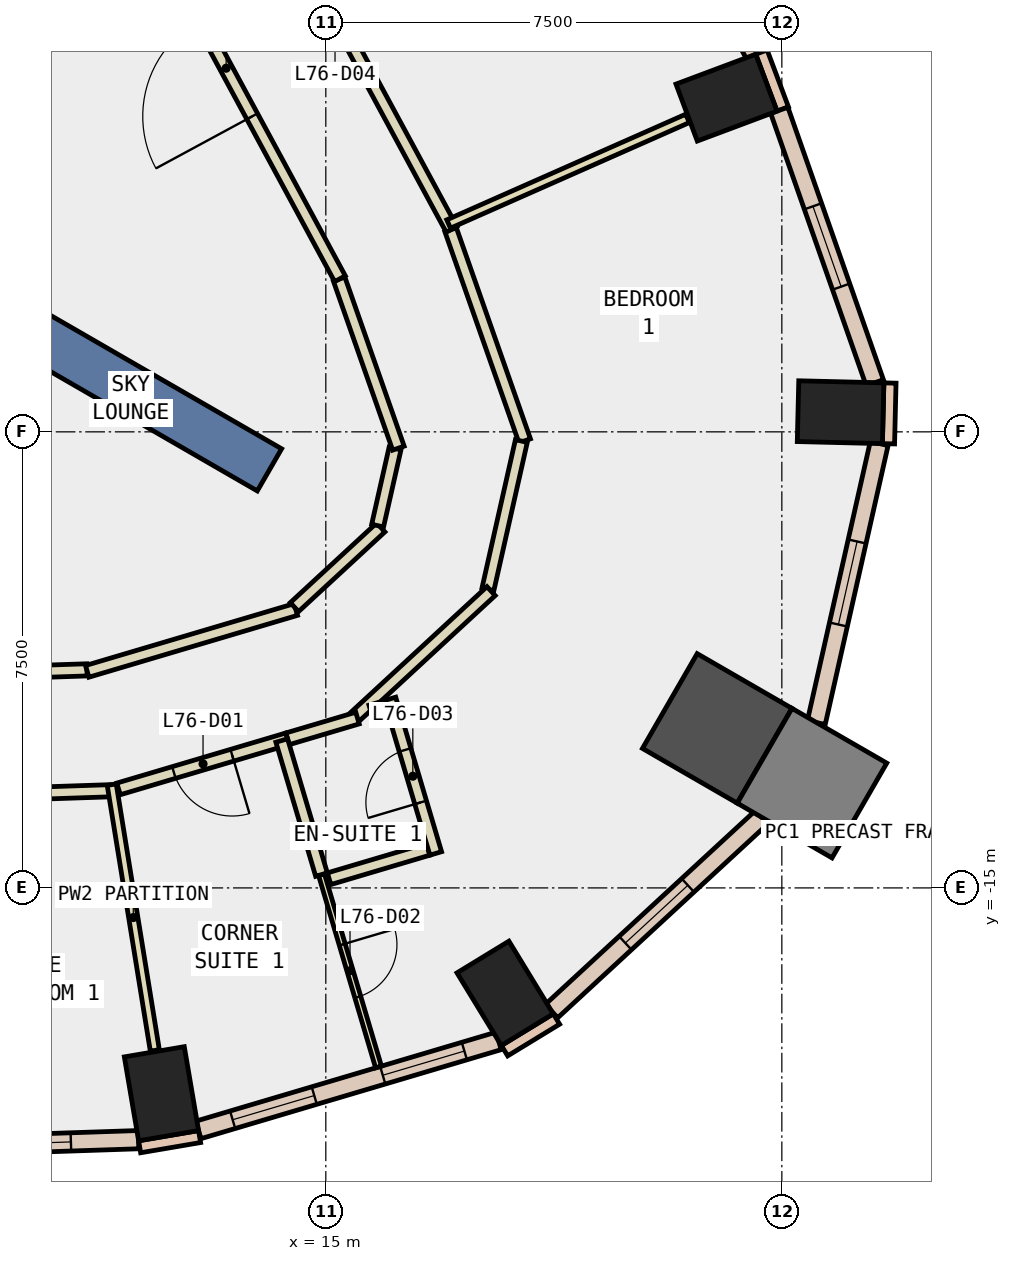
"""IFC4 building model, lengths in metres.
Left out: names, types, materials, properties, quantities, classifications, styles, units other than length and angle.
Written with IfcOpenShell. Run it as: python <this file> out.ifc"""

import sys

from ifc_helpers import new_model, si_unit, direction, frame, frame_2d, origin, origin_2d, place, context, subcontext, project, spatial, rectangle, extrude, element, fill, save


model = new_model("IFC4")
c1 = context("Model", 3, precision=1e-05, world=origin(), true_north=direction((0.0, 1.0)))
c2 = subcontext(c1, "Body", "Model", "MODEL_VIEW")
j1 = project(units=[si_unit("LENGTHUNIT", "METRE"), si_unit("PLANEANGLEUNIT", "RADIAN")], contexts=[c1])
p1 = place(None, origin())
s1 = spatial("IfcSite", under=j1, at=p1, CompositionType="ELEMENT")
p2 = place(p1, origin())
s2 = spatial("IfcBuilding", under=s1, at=p2, CompositionType="ELEMENT")
p3 = place(p2, frame((0.0, 0.0, 322.4)))
s3 = spatial("IfcBuildingStorey", under=s2, at=p3, CompositionType="ELEMENT", Elevation=322.4)
for number, where, z_axis, x_axis in (
    (1, (12.297, -18.385, -0.34), (0.0, 0.0, 1.0), (0.986, 0.168, 0.0)),
    (2, (17.949, -16.734, -0.34), (0.0, 0.0, 1.0), (0.854, 0.521, 0.0)),
):
    element("IfcColumn", number, at=place(p3, frame(where, z_axis=z_axis, x_axis=x_axis)), inside=s3, PredefinedType="COLUMN", context=c2, shape_type="SweptSolid", body=[
        extrude(rectangle(XDim=1.0, YDim=1.4, at=origin_2d()), origin(), (0.0, 0.0, 1.0), 3.34),
    ])
p4 = place(p3, frame((21.437, -12.377, -0.34), z_axis=(0.0, 0.0, 1.0), x_axis=(-0.866025403784, 0.5, 0.0)))
e3 = element("IfcColumn", 3, at=p4, inside=s3, PredefinedType="COLUMN", context=c2, shape_type="SweptSolid", body=[
    extrude(rectangle(XDim=1.8, YDim=1.8, at=origin_2d()), origin(), (0.0, 0.0, 1.0), 3.34),
])
for number, where, z_axis, x_axis in (
    (4, (23.466, -7.177, -0.34), (0.0, 0.0, 1.0), (0.024, 1.0, 0.0)),
    (5, (21.59, -2.004, -0.34), (0.0, 0.0, 1.0), (-0.351, 0.936, 0.0)),
):
    element("IfcColumn", number, at=place(p3, frame(where, z_axis=z_axis, x_axis=x_axis)), inside=s3, PredefinedType="COLUMN", context=c2, shape_type="SweptSolid", body=[
        extrude(rectangle(XDim=1.0, YDim=1.4, at=origin_2d()), origin(), (0.0, 0.0, 1.0), 3.34),
    ])
p5 = place(p3, frame((22.996, -13.277, -0.34), z_axis=(0.0, 0.0, 1.0), x_axis=(-0.866025403784, 0.5, 0.0)))
e6 = element("IfcColumn", 6, at=p5, inside=s3, PredefinedType="COLUMN", context=c2, shape_type="SweptSolid", body=[
    extrude(rectangle(XDim=1.8, YDim=1.8, at=origin_2d()), origin(), (0.0, 0.0, 1.0), 3.34),
])
p6 = place(p3, frame((6.279, -3.625, -0.34), z_axis=(0.0, 0.0, 1.0), x_axis=(0.866017533419, -0.500013631625, 0.0)))
e7 = element("IfcWall", 7, at=p6, inside=s3, PredefinedType="SHEAR", context=c2, shape_type="SweptSolid", body=[
    extrude(rectangle(XDim=9.0, YDim=0.8, at=frame_2d((4.5, 0.0))), origin(), (0.0, 0.0, 1.0), 3.34),
])
p7 = place(p3, frame((22.515, -2.191, 0.0), z_axis=(0.0, 0.0, 1.0), x_axis=(-0.350962844851, 0.936389385637, 0.0)))
e8 = element("IfcWall", 8, at=p7, inside=s3, PredefinedType="STANDARD", context=c2, shape_type="SweptSolid", body=[
    extrude(rectangle(XDim=1.0, YDim=0.2, at=frame_2d((0.5, 0.0))), origin(), (0.0, 0.0, 1.0), 3.0),
])
p8 = place(p3, frame((11.938, -19.257, 0.0), z_axis=(0.0, 0.0, 1.0), x_axis=(0.985800545746, 0.167920469293, 0.0)))
e9 = element("IfcWall", 9, at=p8, inside=s3, PredefinedType="STANDARD", context=c2, shape_type="SweptSolid", body=[
    extrude(rectangle(XDim=1.0, YDim=0.2, at=frame_2d((0.5, 0.0))), origin(), (0.0, 0.0, 1.0), 3.0),
])
p9 = place(p3, frame((17.939, -17.677, 0.0), z_axis=(0.0, 0.0, 1.0), x_axis=(0.853679739553, 0.520798331677, 0.0)))
e10 = element("IfcWall", 10, at=p9, inside=s3, PredefinedType="STANDARD", context=c2, shape_type="SweptSolid", body=[
    extrude(rectangle(XDim=1.0, YDim=0.2, at=frame_2d((0.5, 0.0))), origin(), (0.0, 0.0, 1.0), 3.0),
])
p10 = place(p3, frame((24.254, -7.696, 0.0), z_axis=(0.0, 0.0, 1.0), x_axis=(0.024186470916, 0.999707464524, 0.0)))
e11 = element("IfcWall", 11, at=p10, inside=s3, PredefinedType="STANDARD", context=c2, shape_type="SweptSolid", body=[
    extrude(rectangle(XDim=0.999, YDim=0.2, at=frame_2d((0.5, 0.0))), origin(), (0.0, 0.0, 1.0), 3.0),
])
p11 = place(p3, frame((8.296, -19.261, 0.0), z_axis=(0.0, 0.0, 1.0), x_axis=(0.999441913039, 0.033404527552, 0.0)))
e12 = element("IfcWall", 12, at=p11, inside=s3, PredefinedType="STANDARD", context=c2, shape_type="SweptSolid", body=[
    extrude(rectangle(XDim=3.625, YDim=0.3, at=frame_2d((1.812, 0.0))), origin(), (0.0, 0.0, 1.0), 3.0),
])
p12 = place(p11, frame((1.113, 0.0, 0.9)))
e13 = element("IfcOpeningElement", 13, at=p12, cuts=e12, PredefinedType="OPENING", context=c2, shape_type="SweptSolid", body=[
    extrude(rectangle(XDim=1.4, YDim=2.0, at=frame_2d((0.7, 1.0))), frame((0.0, 0.16, 0.0), z_axis=(0.0, -1.0, 0.0), x_axis=(1.0, 0.0, 0.0)), (0.0, 0.0, 1.0), 0.32),
])
p13 = place(p3, frame((12.904, -18.98, 0.0), z_axis=(0.0, 0.0, 1.0), x_axis=(0.958757933751, 0.284223898486, 0.0)))
e14 = element("IfcWall", 14, at=p13, inside=s3, PredefinedType="STANDARD", context=c2, shape_type="SweptSolid", body=[
    extrude(rectangle(XDim=5.15, YDim=0.3, at=frame_2d((2.575, 0.0))), origin(), (0.0, 0.0, 1.0), 3.0),
])
p14 = place(p13, frame((0.588, 0.0, 0.9)))
e15 = element("IfcOpeningElement", 15, at=p14, cuts=e14, PredefinedType="OPENING", context=c2, shape_type="SweptSolid", body=[
    extrude(rectangle(XDim=1.4, YDim=2.0, at=frame_2d((0.7, 1.0))), frame((0.0, 0.16, 0.0), z_axis=(0.0, -1.0, 0.0), x_axis=(1.0, 0.0, 0.0)), (0.0, 0.0, 1.0), 0.32),
])
p15 = place(p13, frame((3.163, 0.0, 0.9)))
e16 = element("IfcOpeningElement", 16, at=p15, cuts=e14, PredefinedType="OPENING", context=c2, shape_type="SweptSolid", body=[
    extrude(rectangle(XDim=1.4, YDim=2.0, at=frame_2d((0.7, 1.0))), frame((0.0, 0.16, 0.0), z_axis=(0.0, -1.0, 0.0), x_axis=(1.0, 0.0, 0.0)), (0.0, 0.0, 1.0), 0.32),
])
p16 = place(p3, frame((18.712, -17.026, 0.0), z_axis=(0.0, 0.0, 1.0), x_axis=(0.734934798699, 0.678137774838, 0.0)))
e17 = element("IfcWall", 17, at=p16, inside=s3, PredefinedType="STANDARD", context=c2, shape_type="SweptSolid", body=[
    extrude(rectangle(XDim=4.703, YDim=0.3, at=frame_2d((2.351, 0.0))), origin(), (0.0, 0.0, 1.0), 3.0),
])
p17 = place(p16, frame((1.651, 0.0, 0.9)))
e18 = element("IfcOpeningElement", 18, at=p17, cuts=e17, PredefinedType="OPENING", context=c2, shape_type="SweptSolid", body=[
    extrude(rectangle(XDim=1.4, YDim=2.0, at=frame_2d((0.7, 1.0))), frame((0.0, 0.16, 0.0), z_axis=(0.0, -1.0, 0.0), x_axis=(1.0, 0.0, 0.0)), (0.0, 0.0, 1.0), 0.32),
])
p18 = place(p3, frame((23.067, -12.28, 0.0), z_axis=(0.0, 0.0, 1.0), x_axis=(0.219886442412, 0.975525475036, 0.0)))
e19 = element("IfcWall", 19, at=p18, inside=s3, PredefinedType="STANDARD", context=c2, shape_type="SweptSolid", body=[
    extrude(rectangle(XDim=4.703, YDim=0.3, at=frame_2d((2.352, 0.0))), origin(), (0.0, 0.0, 1.0), 3.0),
])
p19 = place(p18, frame((1.652, 0.0, 0.9)))
e20 = element("IfcOpeningElement", 20, at=p19, cuts=e19, PredefinedType="OPENING", context=c2, shape_type="SweptSolid", body=[
    extrude(rectangle(XDim=1.4, YDim=2.0, at=frame_2d((0.7, 1.0))), frame((0.0, 0.16, 0.0), z_axis=(0.0, -1.0, 0.0), x_axis=(1.0, 0.0, 0.0)), (0.0, 0.0, 1.0), 0.32),
])
p20 = place(p3, frame((24.029, -6.692, 0.0), z_axis=(0.0, 0.0, 1.0), x_axis=(-0.330923030855, 0.943657749213, 0.0)))
e21 = element("IfcWall", 21, at=p20, inside=s3, PredefinedType="STANDARD", context=c2, shape_type="SweptSolid", body=[
    extrude(rectangle(XDim=4.748, YDim=0.3, at=frame_2d((2.374, 0.0))), origin(), (0.0, 0.0, 1.0), 3.0),
])
p21 = place(p20, frame((1.674, 0.0, 0.9)))
e22 = element("IfcOpeningElement", 22, at=p21, cuts=e21, PredefinedType="OPENING", context=c2, shape_type="SweptSolid", body=[
    extrude(rectangle(XDim=1.4, YDim=2.0, at=frame_2d((0.7, 1.0))), frame((0.0, 0.16, 0.0), z_axis=(0.0, -1.0, 0.0), x_axis=(1.0, 0.0, 0.0)), (0.0, 0.0, 1.0), 0.32),
])
p22 = place(p3, frame((22.052, -1.298, 0.0), z_axis=(0.0, 0.0, 1.0), x_axis=(-0.475690331633, 0.879612817319, 0.0)))
e23 = element("IfcWall", 23, at=p22, inside=s3, PredefinedType="STANDARD", context=c2, shape_type="SweptSolid", body=[
    extrude(rectangle(XDim=7.484, YDim=0.3, at=frame_2d((3.742, 0.0))), origin(), (0.0, 0.0, 1.0), 3.0),
])
p23 = place(p22, frame((0.771, 0.0, 0.9)))
e24 = element("IfcOpeningElement", 24, at=p23, cuts=e23, PredefinedType="OPENING", context=c2, shape_type="SweptSolid", body=[
    extrude(rectangle(XDim=2.2, YDim=2.0, at=frame_2d((1.1, 1.0))), frame((0.0, 0.16, 0.0), z_axis=(0.0, -1.0, 0.0), x_axis=(1.0, 0.0, 0.0)), (0.0, 0.0, 1.0), 0.32),
])
p24 = place(p22, frame((4.513, 0.0, 0.9)))
e25 = element("IfcOpeningElement", 25, at=p24, cuts=e23, PredefinedType="OPENING", context=c2, shape_type="SweptSolid", body=[
    extrude(rectangle(XDim=2.2, YDim=2.0, at=frame_2d((1.1, 1.0))), frame((0.0, 0.16, 0.0), z_axis=(0.0, -1.0, 0.0), x_axis=(1.0, 0.0, 0.0)), (0.0, 0.0, 1.0), 0.32),
])
p25 = place(p3, frame((7.9, -11.52, 0.0), z_axis=(0.0, 0.0, 1.0), x_axis=(0.999442599499, 0.033383982774, 0.0)))
e26 = element("IfcWall", 26, at=p25, inside=s3, PredefinedType="PARTITIONING", context=c2, shape_type="SweptSolid", body=[
    extrude(rectangle(XDim=3.174, YDim=0.2, at=frame_2d((1.587, 0.0))), origin(), (0.0, 0.0, 1.0), 3.0),
])
p26 = place(p3, frame((11.076, -11.439, 0.0), z_axis=(0.0, 0.0, 1.0), x_axis=(0.958760241353, 0.284216114252, 0.0)))
e27 = element("IfcWall", 27, at=p26, inside=s3, PredefinedType="PARTITIONING", context=c2, shape_type="SweptSolid", body=[
    extrude(rectangle(XDim=3.578, YDim=0.2, at=frame_2d((1.789, 0.0))), origin(), (0.0, 0.0, 1.0), 3.0),
])
p27 = place(p3, frame((14.484, -10.382, 0.0), z_axis=(0.0, 0.0, 1.0), x_axis=(0.735026247728, 0.678038653139, 0.0)))
e28 = element("IfcWall", 28, at=p27, inside=s3, PredefinedType="PARTITIONING", context=c2, shape_type="SweptSolid", body=[
    extrude(rectangle(XDim=1.932, YDim=0.2, at=frame_2d((0.966, 0.0))), origin(), (0.0, 0.0, 1.0), 3.0),
])
p28 = place(p3, frame((15.852, -9.042, 0.0), z_axis=(0.0, 0.0, 1.0), x_axis=(0.220324178782, 0.975426704701, 0.0)))
e29 = element("IfcWall", 29, at=p28, inside=s3, PredefinedType="PARTITIONING", context=c2, shape_type="SweptSolid", body=[
    extrude(rectangle(XDim=1.302, YDim=0.2, at=frame_2d((0.651, 0.0))), origin(), (0.0, 0.0, 1.0), 3.0),
])
p29 = place(p3, frame((16.194, -7.768, 0.0), z_axis=(0.0, 0.0, 1.0), x_axis=(-0.330981563235, 0.943637220969, 0.0)))
e30 = element("IfcWall", 30, at=p29, inside=s3, PredefinedType="PARTITIONING", context=c2, shape_type="SweptSolid", body=[
    extrude(rectangle(XDim=2.946, YDim=0.2, at=frame_2d((1.473, 0.0))), origin(), (0.0, 0.0, 1.0), 3.0),
])
p30 = place(p3, frame((15.233, -4.982, 0.0), z_axis=(0.0, 0.0, 1.0), x_axis=(-0.475643534049, 0.879638123615, 0.0)))
e31 = element("IfcWall", 31, at=p30, inside=s3, PredefinedType="PARTITIONING", context=c2, shape_type="SweptSolid", body=[
    extrude(rectangle(XDim=7.871, YDim=0.2, at=frame_2d((3.936, 0.0))), origin(), (0.0, 0.0, 1.0), 3.0),
])
p31 = place(p30, frame((3.036, 0.0, 0.0)))
e32 = element("IfcOpeningElement", 32, at=p31, cuts=e31, PredefinedType="OPENING", context=c2, shape_type="SweptSolid", body=[
    extrude(rectangle(XDim=1.8, YDim=2.1, at=frame_2d((0.9, 1.05))), frame((0.0, 0.11, 0.0), z_axis=(0.0, -1.0, 0.0), x_axis=(1.0, 0.0, 0.0)), (0.0, 0.0, 1.0), 0.22),
])
p32 = place(p3, frame((11.52, -13.4, 0.0), z_axis=(0.0, 0.0, 1.0), x_axis=(-0.999441010134, -0.033431530957, 0.0)))
e33 = element("IfcWall", 33, at=p32, inside=s3, PredefinedType="PARTITIONING", context=c2, shape_type="SweptSolid", body=[
    extrude(rectangle(XDim=3.622, YDim=0.2, at=frame_2d((1.811, 0.0))), origin(), (0.0, 0.0, 1.0), 3.0),
])
p33 = place(p3, frame((14.371, -12.548, 0.0), z_axis=(0.0, 0.0, 1.0), x_axis=(-0.958773475867, -0.284171465799, 0.0)))
e34 = element("IfcWall", 34, at=p33, inside=s3, PredefinedType="PARTITIONING", context=c2, shape_type="SweptSolid", body=[
    extrude(rectangle(XDim=2.9, YDim=0.2, at=frame_2d((1.45, 0.0))), origin(), (0.0, 0.0, 1.0), 3.0),
])
p34 = place(p33, frame((0.95, 0.0, 0.0)))
e35 = element("IfcOpeningElement", 35, at=p34, cuts=e34, PredefinedType="OPENING", context=c2, shape_type="SweptSolid", body=[
    extrude(rectangle(XDim=1.0, YDim=2.1, at=frame_2d((0.5, 1.05))), frame((0.0, 0.11, 0.0), z_axis=(0.0, -1.0, 0.0), x_axis=(1.0, 0.0, 0.0)), (0.0, 0.0, 1.0), 0.22),
])
p35 = place(p3, frame((17.053, -4.177, 0.0), z_axis=(0.0, 0.0, 1.0), x_axis=(0.33112192567, -0.943587977001, 0.0)))
e36 = element("IfcWall", 36, at=p35, inside=s3, PredefinedType="PARTITIONING", context=c2, shape_type="SweptSolid", body=[
    extrude(rectangle(XDim=3.678, YDim=0.2, at=frame_2d((1.839, 0.0))), origin(), (0.0, 0.0, 1.0), 3.0),
])
p36 = place(p3, frame((18.216, -7.651, 0.0), z_axis=(0.0, 0.0, 1.0), x_axis=(-0.219979161162, -0.975504571314, 0.0)))
e37 = element("IfcWall", 37, at=p36, inside=s3, PredefinedType="PARTITIONING", context=c2, shape_type="SweptSolid", body=[
    extrude(rectangle(XDim=2.5, YDim=0.2, at=frame_2d((1.25, 0.0))), origin(), (0.0, 0.0, 1.0), 3.0),
])
p37 = place(p3, frame((17.718, -10.119, 0.0), z_axis=(0.0, 0.0, 1.0), x_axis=(-0.734673909713, -0.678420405344, 0.0)))
e38 = element("IfcWall", 38, at=p37, inside=s3, PredefinedType="PARTITIONING", context=c2, shape_type="SweptSolid", body=[
    extrude(rectangle(XDim=3.107, YDim=0.2, at=frame_2d((1.554, 0.0))), origin(), (0.0, 0.0, 1.0), 3.0),
])
p38 = place(p3, frame((15.521, -12.207, 0.0), z_axis=(0.0, 0.0, 1.0), x_axis=(-0.958717989575, -0.2843586054, 0.0)))
e39 = element("IfcWall", 39, at=p38, inside=s3, PredefinedType="PARTITIONING", context=c2, shape_type="SweptSolid", body=[
    extrude(rectangle(XDim=1.199, YDim=0.2, at=frame_2d((0.6, 0.0))), origin(), (0.0, 0.0, 1.0), 3.0),
])
p39 = place(p3, frame((13.235, 2.918, 0.0), z_axis=(0.0, 0.0, 1.0), x_axis=(0.475681790703, -0.879617436158, 0.0)))
e40 = element("IfcWall", 40, at=p39, inside=s3, PredefinedType="PARTITIONING", context=c2, shape_type="SweptSolid", body=[
    extrude(rectangle(XDim=8.058, YDim=0.2, at=frame_2d((4.029, 0.0))), origin(), (0.0, 0.0, 1.0), 3.0),
])
p40 = place(p39, frame((3.529, 0.0, 0.0)))
e41 = element("IfcOpeningElement", 41, at=p40, cuts=e40, PredefinedType="OPENING", context=c2, shape_type="SweptSolid", body=[
    extrude(rectangle(XDim=1.0, YDim=2.1, at=frame_2d((0.5, 1.05))), frame((0.0, 0.11, 0.0), z_axis=(0.0, -1.0, 0.0), x_axis=(1.0, 0.0, 0.0)), (0.0, 0.0, 1.0), 0.22),
])
p41 = place(p3, frame((11.479, -13.302, 0.0), z_axis=(0.0, 0.0, 1.0), x_axis=(0.16010600403, -0.987099826499, 0.0)))
e42 = element("IfcWall", 42, at=p41, inside=s3, PredefinedType="PARTITIONING", context=c2, shape_type="SweptSolid", body=[
    extrude(rectangle(XDim=4.428, YDim=0.15, at=frame_2d((2.214, 0.0))), origin(), (0.0, 0.0, 1.0), 3.0),
])
p42 = place(p3, frame((14.929, -14.781, 0.0), z_axis=(0.0, 0.0, 1.0), x_axis=(0.284224342284, -0.958757802186, 0.0)))
e43 = element("IfcWall", 43, at=p42, inside=s3, PredefinedType="PARTITIONING", context=c2, shape_type="SweptSolid", body=[
    extrude(rectangle(XDim=3.3, YDim=0.1, at=frame_2d((1.65, 0.0))), origin(), (0.0, 0.0, 1.0), 3.0),
])
p43 = place(p42, frame((1.2, 0.0, 0.0)))
e44 = element("IfcOpeningElement", 44, at=p43, cuts=e43, PredefinedType="OPENING", context=c2, shape_type="SweptSolid", body=[
    extrude(rectangle(XDim=0.9, YDim=2.1, at=frame_2d((0.45, 1.05))), frame((0.0, 0.06, 0.0), z_axis=(0.0, -1.0, 0.0), x_axis=(1.0, 0.0, 0.0)), (0.0, 0.0, 1.0), 0.12),
])
p44 = place(p3, frame((14.275, -12.576, 0.0), z_axis=(0.0, 0.0, 1.0), x_axis=(0.284366601045, -0.958715618007, 0.0)))
e45 = element("IfcWall", 45, at=p44, inside=s3, PredefinedType="PARTITIONING", context=c2, shape_type="SweptSolid", body=[
    extrude(rectangle(XDim=2.3, YDim=0.2, at=frame_2d((1.15, 0.0))), origin(), (0.0, 0.0, 1.0), 3.0),
])
p45 = place(p3, frame((15.054, -14.849, 0.0), z_axis=(0.0, 0.0, 1.0), x_axis=(0.958727061754, 0.284328016666, 0.0)))
e46 = element("IfcWall", 46, at=p45, inside=s3, PredefinedType="PARTITIONING", context=c2, shape_type="SweptSolid", body=[
    extrude(rectangle(XDim=1.699, YDim=0.2, at=frame_2d((0.85, 0.0))), origin(), (0.0, 0.0, 1.0), 3.0),
])
p46 = place(p3, frame((16.808, -14.433, 0.0), z_axis=(0.0, 0.0, 1.0), x_axis=(-0.284524220245, 0.958668852156, 0.0)))
e47 = element("IfcWall", 47, at=p46, inside=s3, PredefinedType="PARTITIONING", context=c2, shape_type="SweptSolid", body=[
    extrude(rectangle(XDim=2.651, YDim=0.2, at=frame_2d((1.325, 0.0))), origin(), (0.0, 0.0, 1.0), 3.0),
])
p47 = place(p46, frame((0.875, 0.0, 0.0)))
e48 = element("IfcOpeningElement", 48, at=p47, cuts=e47, PredefinedType="OPENING", context=c2, shape_type="SweptSolid", body=[
    extrude(rectangle(XDim=0.9, YDim=2.1, at=frame_2d((0.45, 1.05))), frame((0.0, 0.11, 0.0), z_axis=(0.0, -1.0, 0.0), x_axis=(1.0, 0.0, 0.0)), (0.0, 0.0, 1.0), 0.22),
])
p48 = place(p3, frame((15.987, -12.017, 0.0), z_axis=(0.0, 0.0, 1.0), x_axis=(-0.958598776535, -0.284760224794, 0.0)))
e49 = element("IfcWall", 49, at=p48, inside=s3, PredefinedType="PARTITIONING", context=c2, shape_type="SweptSolid", body=[
    extrude(rectangle(XDim=0.26, YDim=0.2, at=frame_2d((0.13, 0.0))), origin(), (0.0, 0.0, 1.0), 3.0),
])
p49 = place(p3, frame((17.02, -4.082, 0.0), z_axis=(0.0, 0.0, 1.0), x_axis=(0.914599611743, 0.404360668462, 0.0)))
e50 = element("IfcWall", 50, at=p49, inside=s3, PredefinedType="PARTITIONING", context=c2, shape_type="SweptSolid", body=[
    extrude(rectangle(XDim=4.296, YDim=0.15, at=frame_2d((2.148, 0.0))), origin(), (0.0, 0.0, 1.0), 3.0),
])
p50 = place(p12, origin())
e51 = element("IfcWindow", 51, at=p50, inside=s3, PartitioningType="SINGLE_PANEL", PredefinedType="WINDOW", context=c2, shape_type="SweptSolid", body=[
    extrude(rectangle(XDim=1.4, YDim=2.0, at=frame_2d((0.7, 1.0))), frame((0.0, 0.03, 0.0), z_axis=(0.0, -1.0, 0.0), x_axis=(1.0, 0.0, 0.0)), (0.0, 0.0, 1.0), 0.06),
])
fill(e13, e51)
p51 = place(p14, origin())
e52 = element("IfcWindow", 52, at=p51, inside=s3, PartitioningType="SINGLE_PANEL", PredefinedType="WINDOW", context=c2, shape_type="SweptSolid", body=[
    extrude(rectangle(XDim=1.4, YDim=2.0, at=frame_2d((0.7, 1.0))), frame((0.0, 0.03, 0.0), z_axis=(0.0, -1.0, 0.0), x_axis=(1.0, 0.0, 0.0)), (0.0, 0.0, 1.0), 0.06),
])
fill(e15, e52)
p52 = place(p15, origin())
e53 = element("IfcWindow", 53, at=p52, inside=s3, PartitioningType="SINGLE_PANEL", PredefinedType="WINDOW", context=c2, shape_type="SweptSolid", body=[
    extrude(rectangle(XDim=1.4, YDim=2.0, at=frame_2d((0.7, 1.0))), frame((0.0, 0.03, 0.0), z_axis=(0.0, -1.0, 0.0), x_axis=(1.0, 0.0, 0.0)), (0.0, 0.0, 1.0), 0.06),
])
fill(e16, e53)
p53 = place(p17, origin())
e54 = element("IfcWindow", 54, at=p53, inside=s3, PartitioningType="SINGLE_PANEL", PredefinedType="WINDOW", context=c2, shape_type="SweptSolid", body=[
    extrude(rectangle(XDim=1.4, YDim=2.0, at=frame_2d((0.7, 1.0))), frame((0.0, 0.03, 0.0), z_axis=(0.0, -1.0, 0.0), x_axis=(1.0, 0.0, 0.0)), (0.0, 0.0, 1.0), 0.06),
])
fill(e18, e54)
p54 = place(p19, origin())
e55 = element("IfcWindow", 55, at=p54, inside=s3, PartitioningType="SINGLE_PANEL", PredefinedType="WINDOW", context=c2, shape_type="SweptSolid", body=[
    extrude(rectangle(XDim=1.4, YDim=2.0, at=frame_2d((0.7, 1.0))), frame((0.0, 0.03, 0.0), z_axis=(0.0, -1.0, 0.0), x_axis=(1.0, 0.0, 0.0)), (0.0, 0.0, 1.0), 0.06),
])
fill(e20, e55)
p55 = place(p21, origin())
e56 = element("IfcWindow", 56, at=p55, inside=s3, PartitioningType="SINGLE_PANEL", PredefinedType="WINDOW", context=c2, shape_type="SweptSolid", body=[
    extrude(rectangle(XDim=1.4, YDim=2.0, at=frame_2d((0.7, 1.0))), frame((0.0, 0.03, 0.0), z_axis=(0.0, -1.0, 0.0), x_axis=(1.0, 0.0, 0.0)), (0.0, 0.0, 1.0), 0.06),
])
fill(e22, e56)
p56 = place(p34, origin())
e57 = element("IfcDoor", 57, at=p56, inside=s3, OperationType="SINGLE_SWING_LEFT", PredefinedType="DOOR", context=c2, shape_type="SweptSolid", body=[
    extrude(rectangle(XDim=1.0, YDim=2.1, at=frame_2d((0.5, 1.05))), frame((0.0, 0.025, 0.0), z_axis=(0.0, -1.0, 0.0), x_axis=(1.0, 0.0, 0.0)), (0.0, 0.0, 1.0), 0.05),
])
fill(e35, e57)
p57 = place(p43, origin())
e58 = element("IfcDoor", 58, at=p57, inside=s3, OperationType="SINGLE_SWING_LEFT", PredefinedType="DOOR", context=c2, shape_type="SweptSolid", body=[
    extrude(rectangle(XDim=0.9, YDim=2.1, at=frame_2d((0.45, 1.05))), frame((0.0, 0.025, 0.0), z_axis=(0.0, -1.0, 0.0), x_axis=(1.0, 0.0, 0.0)), (0.0, 0.0, 1.0), 0.05),
])
fill(e44, e58)
p58 = place(p47, origin())
e59 = element("IfcDoor", 59, at=p58, inside=s3, OperationType="SINGLE_SWING_LEFT", PredefinedType="DOOR", context=c2, shape_type="SweptSolid", body=[
    extrude(rectangle(XDim=0.9, YDim=2.1, at=frame_2d((0.45, 1.05))), frame((0.0, 0.025, 0.0), z_axis=(0.0, -1.0, 0.0), x_axis=(1.0, 0.0, 0.0)), (0.0, 0.0, 1.0), 0.05),
])
fill(e48, e59)
p59 = place(p31, origin())
e60 = element("IfcDoor", 60, at=p59, inside=s3, OperationType="DOUBLE_DOOR_SINGLE_SWING", PredefinedType="DOOR", context=c2, shape_type="SweptSolid", body=[
    extrude(rectangle(XDim=1.8, YDim=2.1, at=frame_2d((0.9, 1.05))), frame((0.0, 0.025, 0.0), z_axis=(0.0, -1.0, 0.0), x_axis=(1.0, 0.0, 0.0)), (0.0, 0.0, 1.0), 0.05),
])
fill(e32, e60)
save(model, sys.argv[1])
